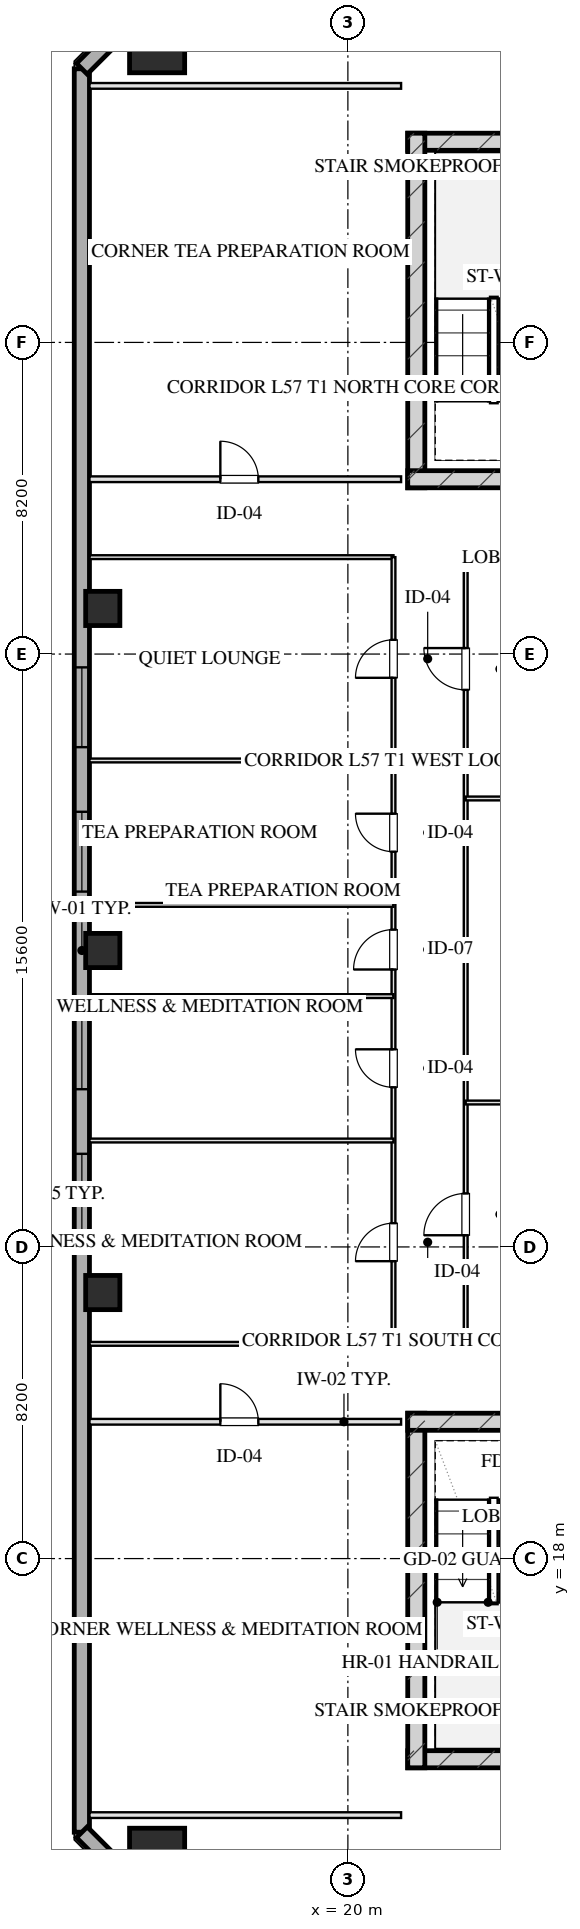
"""IFC4 building model, lengths in metres.
Left out: names, types, materials, properties, quantities, classifications, styles, units other than length and angle.
Written with IfcOpenShell. Run it as: python <this file> out.ifc"""

import sys

from ifc_helpers import new_model, si_unit, direction, frame, frame_2d, origin, origin_2d, place, context, subcontext, project, spatial, rectangle, hollow_rectangle, extrude, element, fill, save


model = new_model("IFC4")
c1 = context("Model", 3, precision=1e-05, world=origin(), true_north=direction((0.0, 1.0)))
c2 = subcontext(c1, "Body", "Model", "MODEL_VIEW")
j1 = project(units=[si_unit("LENGTHUNIT", "METRE"), si_unit("PLANEANGLEUNIT", "RADIAN")], contexts=[c1])
p1 = place(None, origin())
s1 = spatial("IfcSite", under=j1, at=p1, CompositionType="ELEMENT")
p2 = place(p1, origin())
s2 = spatial("IfcBuilding", under=s1, at=p2, CompositionType="ELEMENT")
p3 = place(p2, frame((0.0, 0.0, 212.75)))
s3 = spatial("IfcBuildingStorey", under=s2, at=p3, CompositionType="ELEMENT", Elevation=212.75)
p4 = place(p3, frame((21.575, 12.72, 0.0), z_axis=(0.0, 0.0, 1.0), x_axis=(1.0, 0.0, 0.0)))
e1 = element("IfcWall", 1, at=p4, inside=s3, PredefinedType="SHEAR", context=c2, shape_type="SweptSolid", body=[
    extrude(rectangle(XDim=16.85, YDim=0.45, at=frame_2d((8.425, 0.0))), origin(), (0.0, 0.0, 1.0), 3.45),
])
p5 = place(p3, frame((21.8, 21.825, 0.0), z_axis=(0.0, 0.0, 1.0), x_axis=(0.0, -1.0, 0.0)))
e2 = element("IfcWall", 2, at=p5, inside=s3, PredefinedType="SHEAR", context=c2, shape_type="SweptSolid", body=[
    extrude(rectangle(XDim=9.33, YDim=0.45, at=frame_2d((4.665, 0.0))), origin(), (0.0, 0.0, 1.0), 3.45),
])
p6 = place(p3, frame((21.575, 21.6, 0.0), z_axis=(0.0, 0.0, 1.0), x_axis=(1.0, 0.0, 0.0)))
e3 = element("IfcWall", 3, at=p6, inside=s3, PredefinedType="SHEAR", context=c2, shape_type="SweptSolid", body=[
    extrude(rectangle(XDim=4.145, YDim=0.45, at=frame_2d((2.073, 0.0))), origin(), (0.0, 0.0, 1.0), 3.45),
])
p7 = place(p3, frame((21.575, 55.28, 0.0), z_axis=(0.0, 0.0, 1.0), x_axis=(1.0, 0.0, 0.0)))
e4 = element("IfcWall", 4, at=p7, inside=s3, PredefinedType="SHEAR", context=c2, shape_type="SweptSolid", body=[
    extrude(rectangle(XDim=16.85, YDim=0.45, at=frame_2d((8.425, 0.0))), origin(), (0.0, 0.0, 1.0), 3.45),
])
p8 = place(p3, frame((21.8, 46.175, 0.0), z_axis=(0.0, 0.0, 1.0), x_axis=(0.0, 1.0, 0.0)))
e5 = element("IfcWall", 5, at=p8, inside=s3, PredefinedType="SHEAR", context=c2, shape_type="SweptSolid", body=[
    extrude(rectangle(XDim=9.33, YDim=0.45, at=frame_2d((4.665, 0.0))), origin(), (0.0, 0.0, 1.0), 3.45),
])
p9 = place(p3, frame((21.575, 46.4, 0.0), z_axis=(0.0, 0.0, 1.0), x_axis=(1.0, 0.0, 0.0)))
e6 = element("IfcWall", 6, at=p9, inside=s3, PredefinedType="SHEAR", context=c2, shape_type="SweptSolid", body=[
    extrude(rectangle(XDim=4.145, YDim=0.45, at=frame_2d((2.073, 0.0))), origin(), (0.0, 0.0, 1.0), 3.45),
])
for number, where, z_axis, x_axis in (
    (7, (14.98, 10.18, 0.0), (0.0, 0.0, 1.0), (1.0, 0.0, 0.0)),
    (8, (14.98, 57.82, 0.0), (0.0, 0.0, 1.0), (1.0, 0.0, 0.0)),
):
    element("IfcColumn", number, at=place(p3, frame(where, z_axis=z_axis, x_axis=x_axis)), inside=s3, PredefinedType="COLUMN", context=c2, shape_type="SweptSolid", body=[
        extrude(hollow_rectangle(XDim=1.45, YDim=1.45, WallThickness=0.05, at=origin_2d()), origin(), (0.0, 0.0, 1.0), 3.451),
    ])
for number, where, z_axis, x_axis in (
    (9, (13.55, 25.0, 0.0), (0.0, 0.0, 1.0), (1.0, 0.0, 0.0)),
    (10, (13.55, 34.0, 0.0), (0.0, 0.0, 1.0), (1.0, 0.0, 0.0)),
    (11, (13.55, 43.0, 0.0), (0.0, 0.0, 1.0), (1.0, 0.0, 0.0)),
):
    element("IfcColumn", number, at=place(p3, frame(where, z_axis=z_axis, x_axis=x_axis)), inside=s3, PredefinedType="COLUMN", context=c2, shape_type="SweptSolid", body=[
        extrude(hollow_rectangle(XDim=0.9, YDim=0.9, WallThickness=0.032, at=origin_2d()), origin(), (0.0, 0.0, 1.0), 3.451),
    ])
p10 = place(p3, frame((13.0, 10.8, 0.0), z_axis=(0.0, 0.0, 1.0), x_axis=(0.0, 1.0, 0.0)))
e12 = element("IfcWall", 12, at=p10, inside=s3, PredefinedType="SOLIDWALL", context=c2, shape_type="SweptSolid", body=[
    extrude(rectangle(XDim=46.4, YDim=0.4, at=frame_2d((23.2, 0.0))), origin(), (0.0, 0.0, 1.0), 2.55),
])
p11 = place(p10, frame((15.75, 0.0, 0.75)))
e13 = element("IfcOpeningElement", 13, at=p11, cuts=e12, PredefinedType="OPENING", context=c2, shape_type="SweptSolid", body=[
    extrude(rectangle(XDim=2.1, YDim=1.4, at=frame_2d((1.05, 0.7))), frame((0.0, 0.21, 0.0), z_axis=(0.0, -1.0, 0.0), x_axis=(1.0, 0.0, 0.0)), (0.0, 0.0, 1.0), 0.42),
])
p12 = place(p10, frame((19.55, 0.0, 0.75)))
e14 = element("IfcOpeningElement", 14, at=p12, cuts=e12, PredefinedType="OPENING", context=c2, shape_type="SweptSolid", body=[
    extrude(rectangle(XDim=2.1, YDim=1.4, at=frame_2d((1.05, 0.7))), frame((0.0, 0.21, 0.0), z_axis=(0.0, -1.0, 0.0), x_axis=(1.0, 0.0, 0.0)), (0.0, 0.0, 1.0), 0.42),
])
p13 = place(p10, frame((24.75, 0.0, 0.75)))
e15 = element("IfcOpeningElement", 15, at=p13, cuts=e12, PredefinedType="OPENING", context=c2, shape_type="SweptSolid", body=[
    extrude(rectangle(XDim=2.1, YDim=1.4, at=frame_2d((1.05, 0.7))), frame((0.0, 0.21, 0.0), z_axis=(0.0, -1.0, 0.0), x_axis=(1.0, 0.0, 0.0)), (0.0, 0.0, 1.0), 0.42),
])
p14 = place(p10, frame((28.55, 0.0, 0.75)))
e16 = element("IfcOpeningElement", 16, at=p14, cuts=e12, PredefinedType="OPENING", context=c2, shape_type="SweptSolid", body=[
    extrude(rectangle(XDim=2.1, YDim=1.4, at=frame_2d((1.05, 0.7))), frame((0.0, 0.21, 0.0), z_axis=(0.0, -1.0, 0.0), x_axis=(1.0, 0.0, 0.0)), (0.0, 0.0, 1.0), 0.42),
])
for number, where, z_axis, x_axis in (
    (17, (13.0, 57.2, 0.0), (0.0, 0.0, 1.0), (0.707, 0.707, 0.0)),
    (18, (15.6, 8.2, 0.0), (0.0, 0.0, 1.0), (-0.707, 0.707, 0.0)),
):
    element("IfcWall", number, at=place(p3, frame(where, z_axis=z_axis, x_axis=x_axis)), inside=s3, PredefinedType="SOLIDWALL", context=c2, shape_type="SweptSolid", body=[
        extrude(rectangle(XDim=3.677, YDim=0.4, at=frame_2d((1.838, 0.0))), origin(), (0.0, 0.0, 1.0), 2.55),
    ])
p15 = place(p3, frame((13.2, 11.25, 0.0), z_axis=(0.0, 0.0, 1.0), x_axis=(1.0, 0.0, 0.0)))
e19 = element("IfcWall", 19, at=p15, inside=s3, PredefinedType="PARTITIONING", context=c2, shape_type="SweptSolid", body=[
    extrude(rectangle(XDim=8.2, YDim=0.15, at=frame_2d((4.1, 0.0))), origin(), (0.0, 0.0, 1.0), 3.155),
])
p16 = place(p3, frame((13.2, 21.6, 0.0), z_axis=(0.0, 0.0, 1.0), x_axis=(1.0, 0.0, 0.0)))
e20 = element("IfcWall", 20, at=p16, inside=s3, PredefinedType="PARTITIONING", context=c2, shape_type="SweptSolid", body=[
    extrude(rectangle(XDim=8.2, YDim=0.15, at=frame_2d((4.1, 0.0))), origin(), (0.0, 0.0, 1.0), 3.155),
])
p17 = place(p16, frame((3.444, 0.0, 0.0)))
e21 = element("IfcOpeningElement", 21, at=p17, cuts=e20, PredefinedType="OPENING", context=c2, shape_type="SweptSolid", body=[
    extrude(rectangle(XDim=1.0, YDim=2.05, at=frame_2d((0.5, 1.025))), frame((0.0, 0.085, 0.0), z_axis=(0.0, -1.0, 0.0), x_axis=(1.0, 0.0, 0.0)), (0.0, 0.0, 1.0), 0.17),
])
p18 = place(p3, frame((13.2, 56.75, 0.0), z_axis=(0.0, 0.0, 1.0), x_axis=(1.0, 0.0, 0.0)))
e22 = element("IfcWall", 22, at=p18, inside=s3, PredefinedType="PARTITIONING", context=c2, shape_type="SweptSolid", body=[
    extrude(rectangle(XDim=8.2, YDim=0.15, at=frame_2d((4.1, 0.0))), origin(), (0.0, 0.0, 1.0), 3.155),
])
p19 = place(p3, frame((13.2, 46.4, 0.0), z_axis=(0.0, 0.0, 1.0), x_axis=(1.0, 0.0, 0.0)))
e23 = element("IfcWall", 23, at=p19, inside=s3, PredefinedType="PARTITIONING", context=c2, shape_type="SweptSolid", body=[
    extrude(rectangle(XDim=8.2, YDim=0.15, at=frame_2d((4.1, 0.0))), origin(), (0.0, 0.0, 1.0), 3.155),
])
p20 = place(p19, frame((3.444, 0.0, 0.0)))
e24 = element("IfcOpeningElement", 24, at=p20, cuts=e23, PredefinedType="OPENING", context=c2, shape_type="SweptSolid", body=[
    extrude(rectangle(XDim=1.0, YDim=2.05, at=frame_2d((0.5, 1.025))), frame((0.0, 0.085, 0.0), z_axis=(0.0, -1.0, 0.0), x_axis=(1.0, 0.0, 0.0)), (0.0, 0.0, 1.0), 0.17),
])
p21 = place(p3, frame((13.2, 23.65, 0.0), z_axis=(0.0, 0.0, 1.0), x_axis=(1.0, 0.0, 0.0)))
e25 = element("IfcWall", 25, at=p21, inside=s3, PredefinedType="MOVABLE", context=c2, shape_type="SweptSolid", body=[
    extrude(rectangle(XDim=8.0, YDim=0.1, at=frame_2d((4.0, 0.0))), origin(), (0.0, 0.0, 1.0), 3.155),
])
p22 = place(p3, frame((23.1, 23.65, 0.0), z_axis=(0.0, 0.0, 1.0), x_axis=(1.0, 0.0, 0.0)))
e26 = element("IfcWall", 26, at=p22, inside=s3, PredefinedType="MOVABLE", context=c2, shape_type="SweptSolid", body=[
    extrude(rectangle(XDim=13.55, YDim=0.1, at=frame_2d((6.775, 0.0))), origin(), (0.0, 0.0, 1.0), 3.155),
])
p23 = place(p3, frame((13.2, 44.35, 0.0), z_axis=(0.0, 0.0, 1.0), x_axis=(1.0, 0.0, 0.0)))
e27 = element("IfcWall", 27, at=p23, inside=s3, PredefinedType="MOVABLE", context=c2, shape_type="SweptSolid", body=[
    extrude(rectangle(XDim=8.0, YDim=0.1, at=frame_2d((4.0, 0.0))), origin(), (0.0, 0.0, 1.0), 3.155),
])
p24 = place(p3, frame((23.1, 44.35, 0.0), z_axis=(0.0, 0.0, 1.0), x_axis=(1.0, 0.0, 0.0)))
e28 = element("IfcWall", 28, at=p24, inside=s3, PredefinedType="MOVABLE", context=c2, shape_type="SweptSolid", body=[
    extrude(rectangle(XDim=13.55, YDim=0.1, at=frame_2d((6.775, 0.0))), origin(), (0.0, 0.0, 1.0), 3.155),
])
p25 = place(p3, frame((21.2, 23.65, 0.0), z_axis=(0.0, 0.0, 1.0), x_axis=(0.0, 1.0, 0.0)))
e29 = element("IfcWall", 29, at=p25, inside=s3, PredefinedType="MOVABLE", context=c2, shape_type="SweptSolid", body=[
    extrude(rectangle(XDim=20.7, YDim=0.1, at=frame_2d((10.35, 0.0))), origin(), (0.0, 0.0, 1.0), 3.155),
])
p26 = place(p25, frame((2.175, 0.0, 0.0)))
e30 = element("IfcOpeningElement", 30, at=p26, cuts=e29, PredefinedType="OPENING", context=c2, shape_type="SweptSolid", body=[
    extrude(rectangle(XDim=1.0, YDim=2.05, at=frame_2d((0.5, 1.025))), frame((0.0, 0.06, 0.0), z_axis=(0.0, -1.0, 0.0), x_axis=(1.0, 0.0, 0.0)), (0.0, 0.0, 1.0), 0.12),
])
p27 = place(p25, frame((6.75, 0.0, 0.0)))
e31 = element("IfcOpeningElement", 31, at=p27, cuts=e29, PredefinedType="OPENING", context=c2, shape_type="SweptSolid", body=[
    extrude(rectangle(XDim=1.0, YDim=2.05, at=frame_2d((0.5, 1.025))), frame((0.0, 0.06, 0.0), z_axis=(0.0, -1.0, 0.0), x_axis=(1.0, 0.0, 0.0)), (0.0, 0.0, 1.0), 0.12),
])
p28 = place(p25, frame((9.85, 0.0, 0.0)))
e32 = element("IfcOpeningElement", 32, at=p28, cuts=e29, PredefinedType="OPENING", context=c2, shape_type="SweptSolid", body=[
    extrude(rectangle(XDim=1.05, YDim=2.05, at=frame_2d((0.525, 1.025))), frame((0.0, 0.06, 0.0), z_axis=(0.0, -1.0, 0.0), x_axis=(1.0, 0.0, 0.0)), (0.0, 0.0, 1.0), 0.12),
])
p29 = place(p25, frame((12.95, 0.0, 0.0)))
e33 = element("IfcOpeningElement", 33, at=p29, cuts=e29, PredefinedType="OPENING", context=c2, shape_type="SweptSolid", body=[
    extrude(rectangle(XDim=1.0, YDim=2.05, at=frame_2d((0.5, 1.025))), frame((0.0, 0.06, 0.0), z_axis=(0.0, -1.0, 0.0), x_axis=(1.0, 0.0, 0.0)), (0.0, 0.0, 1.0), 0.12),
])
p30 = place(p25, frame((17.525, 0.0, 0.0)))
e34 = element("IfcOpeningElement", 34, at=p30, cuts=e29, PredefinedType="OPENING", context=c2, shape_type="SweptSolid", body=[
    extrude(rectangle(XDim=1.0, YDim=2.05, at=frame_2d((0.5, 1.025))), frame((0.0, 0.06, 0.0), z_axis=(0.0, -1.0, 0.0), x_axis=(1.0, 0.0, 0.0)), (0.0, 0.0, 1.0), 0.12),
])
p31 = place(p3, frame((23.1, 23.65, 0.0), z_axis=(0.0, 0.0, 1.0), x_axis=(0.0, 1.0, 0.0)))
e35 = element("IfcWall", 35, at=p31, inside=s3, PredefinedType="MOVABLE", context=c2, shape_type="SweptSolid", body=[
    extrude(rectangle(XDim=20.7, YDim=0.1, at=frame_2d((10.35, 0.0))), origin(), (0.0, 0.0, 1.0), 3.155),
])
p32 = place(p31, frame((2.857, 0.0, 0.0)))
e36 = element("IfcOpeningElement", 36, at=p32, cuts=e35, PredefinedType="OPENING", context=c2, shape_type="SweptSolid", body=[
    extrude(rectangle(XDim=1.1, YDim=2.05, at=frame_2d((0.55, 1.025))), frame((0.0, 0.06, 0.0), z_axis=(0.0, -1.0, 0.0), x_axis=(1.0, 0.0, 0.0)), (0.0, 0.0, 1.0), 0.12),
])
p33 = place(p31, frame((17.208, 0.0, 0.0)))
e37 = element("IfcOpeningElement", 37, at=p33, cuts=e35, PredefinedType="OPENING", context=c2, shape_type="SweptSolid", body=[
    extrude(rectangle(XDim=1.1, YDim=2.05, at=frame_2d((0.55, 1.025))), frame((0.0, 0.06, 0.0), z_axis=(0.0, -1.0, 0.0), x_axis=(1.0, 0.0, 0.0)), (0.0, 0.0, 1.0), 0.12),
])
for number, where, z_axis, x_axis in (
    (38, (23.1, 30.0, 0.0), (0.0, 0.0, 1.0), (1.0, 0.0, 0.0)),
    (39, (23.1, 38.0, 0.0), (0.0, 0.0, 1.0), (1.0, 0.0, 0.0)),
):
    element("IfcWall", number, at=place(p3, frame(where, z_axis=z_axis, x_axis=x_axis)), inside=s3, PredefinedType="MOVABLE", context=c2, shape_type="SweptSolid", body=[
        extrude(rectangle(XDim=13.55, YDim=0.1, at=frame_2d((6.775, 0.0))), origin(), (0.0, 0.0, 1.0), 3.155),
    ])
for number, where, z_axis, x_axis in (
    (40, (13.2, 29.0, 0.0), (0.0, 0.0, 1.0), (1.0, 0.0, 0.0)),
    (41, (13.2, 32.8, 0.0), (0.0, 0.0, 1.0), (1.0, 0.0, 0.0)),
    (42, (13.2, 35.2, 0.0), (0.0, 0.0, 1.0), (1.0, 0.0, 0.0)),
    (43, (13.2, 39.0, 0.0), (0.0, 0.0, 1.0), (1.0, 0.0, 0.0)),
):
    element("IfcWall", number, at=place(p3, frame(where, z_axis=z_axis, x_axis=x_axis)), inside=s3, PredefinedType="MOVABLE", context=c2, shape_type="SweptSolid", body=[
        extrude(rectangle(XDim=8.0, YDim=0.1, at=frame_2d((4.0, 0.0))), origin(), (0.0, 0.0, 1.0), 3.155),
    ])
p34 = place(p11, origin())
e44 = element("IfcWindow", 44, at=p34, inside=s3, PartitioningType="TRIPLE_PANEL_VERTICAL", PredefinedType="WINDOW", context=c2, shape_type="SweptSolid", body=[
    extrude(rectangle(XDim=2.1, YDim=1.4, at=frame_2d((1.05, 0.7))), frame((0.0, 0.03, 0.0), z_axis=(0.0, -1.0, 0.0), x_axis=(1.0, 0.0, 0.0)), (0.0, 0.0, 1.0), 0.06),
])
fill(e13, e44)
p35 = place(p12, origin())
e45 = element("IfcWindow", 45, at=p35, inside=s3, PartitioningType="TRIPLE_PANEL_VERTICAL", PredefinedType="WINDOW", context=c2, shape_type="SweptSolid", body=[
    extrude(rectangle(XDim=2.1, YDim=1.4, at=frame_2d((1.05, 0.7))), frame((0.0, 0.03, 0.0), z_axis=(0.0, -1.0, 0.0), x_axis=(1.0, 0.0, 0.0)), (0.0, 0.0, 1.0), 0.06),
])
fill(e14, e45)
p36 = place(p13, origin())
e46 = element("IfcWindow", 46, at=p36, inside=s3, PartitioningType="TRIPLE_PANEL_VERTICAL", PredefinedType="WINDOW", context=c2, shape_type="SweptSolid", body=[
    extrude(rectangle(XDim=2.1, YDim=1.4, at=frame_2d((1.05, 0.7))), frame((0.0, 0.03, 0.0), z_axis=(0.0, -1.0, 0.0), x_axis=(1.0, 0.0, 0.0)), (0.0, 0.0, 1.0), 0.06),
])
fill(e15, e46)
p37 = place(p14, origin())
e47 = element("IfcWindow", 47, at=p37, inside=s3, PartitioningType="TRIPLE_PANEL_VERTICAL", PredefinedType="WINDOW", context=c2, shape_type="SweptSolid", body=[
    extrude(rectangle(XDim=2.1, YDim=1.4, at=frame_2d((1.05, 0.7))), frame((0.0, 0.03, 0.0), z_axis=(0.0, -1.0, 0.0), x_axis=(1.0, 0.0, 0.0)), (0.0, 0.0, 1.0), 0.06),
])
fill(e16, e47)
p38 = place(p17, origin())
e48 = element("IfcDoor", 48, at=p38, inside=s3, OperationType="SINGLE_SWING_LEFT", PredefinedType="DOOR", context=c2, shape_type="SweptSolid", body=[
    extrude(rectangle(XDim=1.0, YDim=2.05, at=frame_2d((0.5, 1.025))), frame((0.0, 0.025, 0.0), z_axis=(0.0, -1.0, 0.0), x_axis=(1.0, 0.0, 0.0)), (0.0, 0.0, 1.0), 0.05),
])
fill(e21, e48)
p39 = place(p20, origin())
e49 = element("IfcDoor", 49, at=p39, inside=s3, OperationType="SINGLE_SWING_LEFT", PredefinedType="DOOR", context=c2, shape_type="SweptSolid", body=[
    extrude(rectangle(XDim=1.0, YDim=2.05, at=frame_2d((0.5, 1.025))), frame((0.0, 0.025, 0.0), z_axis=(0.0, -1.0, 0.0), x_axis=(1.0, 0.0, 0.0)), (0.0, 0.0, 1.0), 0.05),
])
fill(e24, e49)
p40 = place(p26, origin())
e50 = element("IfcDoor", 50, at=p40, inside=s3, OperationType="SINGLE_SWING_LEFT", PredefinedType="DOOR", context=c2, shape_type="SweptSolid", body=[
    extrude(rectangle(XDim=1.0, YDim=2.05, at=frame_2d((0.5, 1.025))), frame((0.0, 0.025, 0.0), z_axis=(0.0, -1.0, 0.0), x_axis=(1.0, 0.0, 0.0)), (0.0, 0.0, 1.0), 0.05),
])
fill(e30, e50)
p41 = place(p27, origin())
e51 = element("IfcDoor", 51, at=p41, inside=s3, OperationType="SINGLE_SWING_RIGHT", PredefinedType="DOOR", context=c2, shape_type="SweptSolid", body=[
    extrude(rectangle(XDim=1.0, YDim=2.05, at=frame_2d((0.5, 1.025))), frame((0.0, 0.025, 0.0), z_axis=(0.0, -1.0, 0.0), x_axis=(1.0, 0.0, 0.0)), (0.0, 0.0, 1.0), 0.05),
])
fill(e31, e51)
p42 = place(p28, origin())
e52 = element("IfcDoor", 52, at=p42, inside=s3, OperationType="SINGLE_SWING_LEFT", PredefinedType="DOOR", context=c2, shape_type="SweptSolid", body=[
    extrude(rectangle(XDim=1.05, YDim=2.05, at=frame_2d((0.525, 1.025))), frame((0.0, 0.025, 0.0), z_axis=(0.0, -1.0, 0.0), x_axis=(1.0, 0.0, 0.0)), (0.0, 0.0, 1.0), 0.05),
])
fill(e32, e52)
p43 = place(p29, origin())
e53 = element("IfcDoor", 53, at=p43, inside=s3, OperationType="SINGLE_SWING_RIGHT", PredefinedType="DOOR", context=c2, shape_type="SweptSolid", body=[
    extrude(rectangle(XDim=1.0, YDim=2.05, at=frame_2d((0.5, 1.025))), frame((0.0, 0.025, 0.0), z_axis=(0.0, -1.0, 0.0), x_axis=(1.0, 0.0, 0.0)), (0.0, 0.0, 1.0), 0.05),
])
fill(e33, e53)
p44 = place(p30, origin())
e54 = element("IfcDoor", 54, at=p44, inside=s3, OperationType="SINGLE_SWING_LEFT", PredefinedType="DOOR", context=c2, shape_type="SweptSolid", body=[
    extrude(rectangle(XDim=1.0, YDim=2.05, at=frame_2d((0.5, 1.025))), frame((0.0, 0.025, 0.0), z_axis=(0.0, -1.0, 0.0), x_axis=(1.0, 0.0, 0.0)), (0.0, 0.0, 1.0), 0.05),
])
fill(e34, e54)
p45 = place(p32, origin())
e55 = element("IfcDoor", 55, at=p45, inside=s3, OperationType="SINGLE_SWING_LEFT", PredefinedType="DOOR", context=c2, shape_type="SweptSolid", body=[
    extrude(rectangle(XDim=1.1, YDim=2.05, at=frame_2d((0.55, 1.025))), frame((0.0, 0.025, 0.0), z_axis=(0.0, -1.0, 0.0), x_axis=(1.0, 0.0, 0.0)), (0.0, 0.0, 1.0), 0.05),
])
fill(e36, e55)
p46 = place(p33, origin())
e56 = element("IfcDoor", 56, at=p46, inside=s3, OperationType="SINGLE_SWING_RIGHT", PredefinedType="DOOR", context=c2, shape_type="SweptSolid", body=[
    extrude(rectangle(XDim=1.1, YDim=2.05, at=frame_2d((0.55, 1.025))), frame((0.0, 0.025, 0.0), z_axis=(0.0, -1.0, 0.0), x_axis=(1.0, 0.0, 0.0)), (0.0, 0.0, 1.0), 0.05),
])
fill(e37, e56)
save(model, sys.argv[1])
